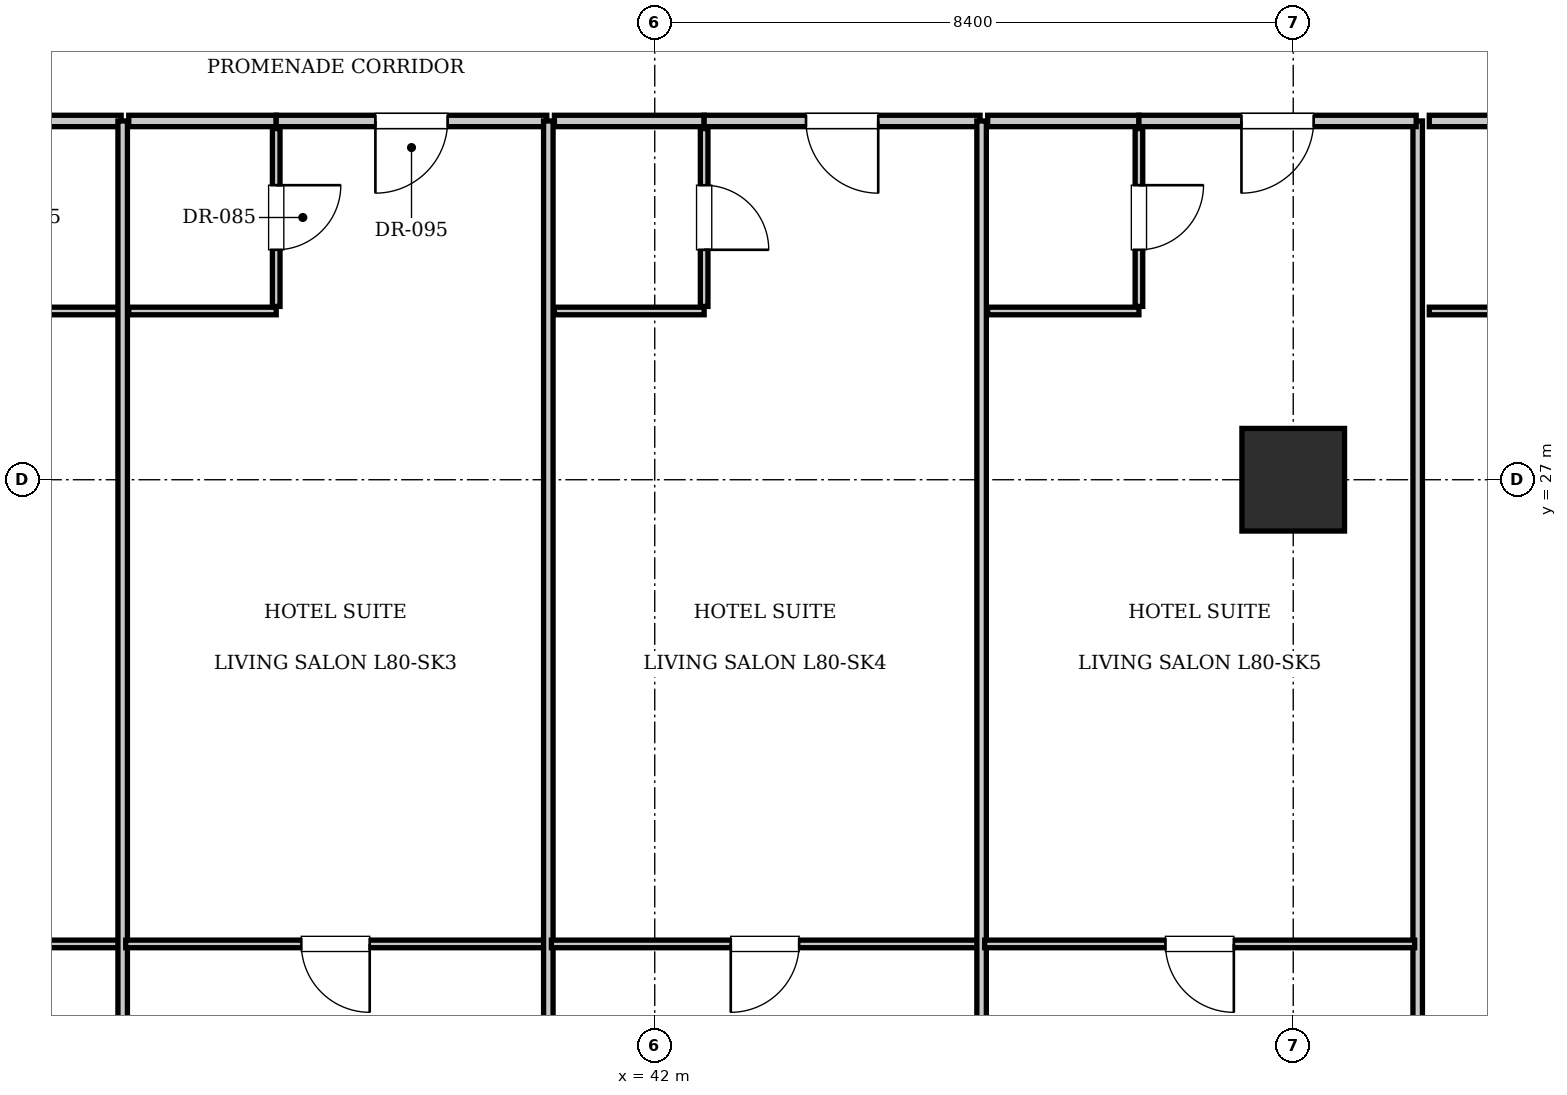
"""IFC4 building model, lengths in metres.
Left out: names, types, materials, properties, quantities, classifications, styles, units other than length and angle.
Written with IfcOpenShell. Run it as: python <this file> out.ifc"""

import sys

from ifc_helpers import new_model, si_unit, direction, frame, frame_2d, origin, origin_2d, place, context, subcontext, project, spatial, rectangle, extrude, element, fill, save


model = new_model("IFC4")
c1 = context("Model", 3, precision=1e-05, world=origin(), true_north=direction((0.0, 1.0)))
c2 = subcontext(c1, "Body", "Model", "MODEL_VIEW")
j1 = project(units=[si_unit("LENGTHUNIT", "METRE"), si_unit("PLANEANGLEUNIT", "RADIAN")], contexts=[c1])
p1 = place(None, origin())
s1 = spatial("IfcSite", under=j1, at=p1, CompositionType="ELEMENT")
p2 = place(p1, origin())
s2 = spatial("IfcBuilding", under=s1, at=p2, CompositionType="ELEMENT")
p3 = place(p2, frame((0.0, 0.0, 325.85)))
s3 = spatial("IfcBuildingStorey", under=s2, at=p3, CompositionType="ELEMENT", Elevation=325.85)
p4 = place(p3, frame((50.4, 27.0, 0.0), z_axis=(0.0, 0.0, 1.0), x_axis=(1.0, 0.0, 0.0)))
e1 = element("IfcColumn", 1, at=p4, inside=s3, PredefinedType="COLUMN", context=c2, shape_type="SweptSolid", body=[
    extrude(rectangle(XDim=1.35, YDim=1.35, at=origin_2d()), origin(), (0.0, 0.0, 1.0), 3.85),
])
p5 = place(p3, frame((52.038, 19.34, 0.0), z_axis=(0.0, 0.0, 1.0), x_axis=(0.0, 1.0, 0.0)))
e2 = element("IfcWall", 2, at=p5, inside=s3, PredefinedType="PARTITIONING", context=c2, shape_type="SweptSolid", body=[
    extrude(rectangle(XDim=12.38, YDim=0.125, at=frame_2d((6.19, 0.0))), origin(), (0.0, 0.0, 1.0), 3.61),
])
p6 = place(p3, frame((32.95, 31.72, 0.0), z_axis=(0.0, 0.0, 1.0), x_axis=(1.0, 0.0, 0.0)))
e3 = element("IfcWall", 3, at=p6, inside=s3, PredefinedType="PARTITIONING", context=c2, shape_type="SweptSolid", body=[
    extrude(rectangle(XDim=2.03, YDim=0.15, at=frame_2d((1.015, 0.0))), origin(), (0.0, 0.0, 1.0), 3.61),
])
p7 = place(p3, frame((32.95, 29.22, 0.0), z_axis=(0.0, 0.0, 1.0), x_axis=(1.0, 0.0, 0.0)))
e4 = element("IfcWall", 4, at=p7, inside=s3, PredefinedType="PARTITIONING", context=c2, shape_type="SweptSolid", body=[
    extrude(rectangle(XDim=2.01, YDim=0.1, at=frame_2d((1.005, 0.0))), origin(), (0.0, 0.0, 1.0), 3.61),
])
p8 = place(p3, frame((29.34, 20.893, 0.0), z_axis=(0.0, 0.0, 1.0), x_axis=(1.0, 0.0, 0.0)))
e5 = element("IfcWall", 5, at=p8, inside=s3, PredefinedType="PARTITIONING", context=c2, shape_type="SweptSolid", body=[
    extrude(rectangle(XDim=5.62, YDim=0.1, at=frame_2d((2.81, 0.0))), origin(), (0.0, 0.0, 1.0), 3.61),
])
p9 = place(p8, frame((2.36, 0.0, 0.0)))
e6 = element("IfcOpeningElement", 6, at=p9, cuts=e5, PredefinedType="OPENING", context=c2, shape_type="SweptSolid", body=[
    extrude(rectangle(XDim=0.9, YDim=2.1, at=frame_2d((0.45, 1.05))), frame((0.0, 0.06, 0.0), z_axis=(0.0, -1.0, 0.0), x_axis=(1.0, 0.0, 0.0)), (0.0, 0.0, 1.0), 0.12),
])
p10 = place(p3, frame((35.0, 13.9, 0.0), z_axis=(0.0, 0.0, 1.0), x_axis=(0.0, 1.0, 0.0)))
e7 = element("IfcWall", 7, at=p10, inside=s3, PredefinedType="PARTITIONING", context=c2, shape_type="SweptSolid", body=[
    extrude(rectangle(XDim=17.82, YDim=0.125, at=frame_2d((8.91, 0.0))), origin(), (0.0, 0.0, 1.0), 3.61),
])
p11 = place(p3, frame((35.08, 31.72, 0.0), z_axis=(0.0, 0.0, 1.0), x_axis=(1.0, 0.0, 0.0)))
e8 = element("IfcWall", 8, at=p11, inside=s3, PredefinedType="PARTITIONING", context=c2, shape_type="SweptSolid", body=[
    extrude(rectangle(XDim=1.94, YDim=0.15, at=frame_2d((0.97, 0.0))), origin(), (0.0, 0.0, 1.0), 3.61),
])
p12 = place(p3, frame((35.08, 29.22, 0.0), z_axis=(0.0, 0.0, 1.0), x_axis=(1.0, 0.0, 0.0)))
e9 = element("IfcWall", 9, at=p12, inside=s3, PredefinedType="PARTITIONING", context=c2, shape_type="SweptSolid", body=[
    extrude(rectangle(XDim=1.94, YDim=0.1, at=frame_2d((0.97, 0.0))), origin(), (0.0, 0.0, 1.0), 3.61),
])
p13 = place(p3, frame((37.02, 29.28, 0.0), z_axis=(0.0, 0.0, 1.0), x_axis=(0.0, 1.0, 0.0)))
e10 = element("IfcWall", 10, at=p13, inside=s3, PredefinedType="PARTITIONING", context=c2, shape_type="SweptSolid", body=[
    extrude(rectangle(XDim=2.34, YDim=0.1, at=frame_2d((1.17, 0.0))), origin(), (0.0, 0.0, 1.0), 3.61),
])
p14 = place(p13, frame((0.745, 0.0, 0.0)))
e11 = element("IfcOpeningElement", 11, at=p14, cuts=e10, PredefinedType="OPENING", context=c2, shape_type="SweptSolid", body=[
    extrude(rectangle(XDim=0.85, YDim=2.1, at=frame_2d((0.425, 1.05))), frame((0.0, 0.06, 0.0), z_axis=(0.0, -1.0, 0.0), x_axis=(1.0, 0.0, 0.0)), (0.0, 0.0, 1.0), 0.12),
])
p15 = place(p3, frame((37.02, 31.72, 0.0), z_axis=(0.0, 0.0, 1.0), x_axis=(1.0, 0.0, 0.0)))
e12 = element("IfcWall", 12, at=p15, inside=s3, PredefinedType="PARTITIONING", context=c2, shape_type="SweptSolid", body=[
    extrude(rectangle(XDim=3.56, YDim=0.15, at=frame_2d((1.78, 0.0))), origin(), (0.0, 0.0, 1.0), 3.61),
])
p16 = place(p15, frame((1.305, 0.0, 0.0)))
e13 = element("IfcOpeningElement", 13, at=p16, cuts=e12, PredefinedType="OPENING", context=c2, shape_type="SweptSolid", body=[
    extrude(rectangle(XDim=0.95, YDim=2.15, at=frame_2d((0.475, 1.075))), frame((0.0, 0.085, 0.0), z_axis=(0.0, -1.0, 0.0), x_axis=(1.0, 0.0, 0.0)), (0.0, 0.0, 1.0), 0.17),
])
p17 = place(p3, frame((35.04, 20.893, 0.0), z_axis=(0.0, 0.0, 1.0), x_axis=(1.0, 0.0, 0.0)))
e14 = element("IfcWall", 14, at=p17, inside=s3, PredefinedType="PARTITIONING", context=c2, shape_type="SweptSolid", body=[
    extrude(rectangle(XDim=5.52, YDim=0.1, at=frame_2d((2.76, 0.0))), origin(), (0.0, 0.0, 1.0), 3.61),
])
p18 = place(p17, frame((2.31, 0.0, 0.0)))
e15 = element("IfcOpeningElement", 15, at=p18, cuts=e14, PredefinedType="OPENING", context=c2, shape_type="SweptSolid", body=[
    extrude(rectangle(XDim=0.9, YDim=2.1, at=frame_2d((0.45, 1.05))), frame((0.0, 0.06, 0.0), z_axis=(0.0, -1.0, 0.0), x_axis=(1.0, 0.0, 0.0)), (0.0, 0.0, 1.0), 0.12),
])
p19 = place(p3, frame((40.6, 13.9, 0.0), z_axis=(0.0, 0.0, 1.0), x_axis=(0.0, 1.0, 0.0)))
e16 = element("IfcWall", 16, at=p19, inside=s3, PredefinedType="PARTITIONING", context=c2, shape_type="SweptSolid", body=[
    extrude(rectangle(XDim=17.82, YDim=0.125, at=frame_2d((8.91, 0.0))), origin(), (0.0, 0.0, 1.0), 3.61),
])
p20 = place(p3, frame((40.68, 31.72, 0.0), z_axis=(0.0, 0.0, 1.0), x_axis=(1.0, 0.0, 0.0)))
e17 = element("IfcWall", 17, at=p20, inside=s3, PredefinedType="PARTITIONING", context=c2, shape_type="SweptSolid", body=[
    extrude(rectangle(XDim=1.97, YDim=0.15, at=frame_2d((0.985, 0.0))), origin(), (0.0, 0.0, 1.0), 3.61),
])
p21 = place(p3, frame((40.68, 29.22, 0.0), z_axis=(0.0, 0.0, 1.0), x_axis=(1.0, 0.0, 0.0)))
e18 = element("IfcWall", 18, at=p21, inside=s3, PredefinedType="PARTITIONING", context=c2, shape_type="SweptSolid", body=[
    extrude(rectangle(XDim=1.97, YDim=0.1, at=frame_2d((0.985, 0.0))), origin(), (0.0, 0.0, 1.0), 3.61),
])
p22 = place(p3, frame((42.65, 29.28, 0.0), z_axis=(0.0, 0.0, 1.0), x_axis=(0.0, 1.0, 0.0)))
e19 = element("IfcWall", 19, at=p22, inside=s3, PredefinedType="PARTITIONING", context=c2, shape_type="SweptSolid", body=[
    extrude(rectangle(XDim=2.34, YDim=0.1, at=frame_2d((1.17, 0.0))), origin(), (0.0, 0.0, 1.0), 3.61),
])
p23 = place(p22, frame((0.745, 0.0, 0.0)))
e20 = element("IfcOpeningElement", 20, at=p23, cuts=e19, PredefinedType="OPENING", context=c2, shape_type="SweptSolid", body=[
    extrude(rectangle(XDim=0.85, YDim=2.1, at=frame_2d((0.425, 1.05))), frame((0.0, 0.06, 0.0), z_axis=(0.0, -1.0, 0.0), x_axis=(1.0, 0.0, 0.0)), (0.0, 0.0, 1.0), 0.12),
])
p24 = place(p3, frame((42.65, 31.72, 0.0), z_axis=(0.0, 0.0, 1.0), x_axis=(1.0, 0.0, 0.0)))
e21 = element("IfcWall", 21, at=p24, inside=s3, PredefinedType="PARTITIONING", context=c2, shape_type="SweptSolid", body=[
    extrude(rectangle(XDim=3.63, YDim=0.15, at=frame_2d((1.815, 0.0))), origin(), (0.0, 0.0, 1.0), 3.61),
])
p25 = place(p24, frame((1.34, 0.0, 0.0)))
e22 = element("IfcOpeningElement", 22, at=p25, cuts=e21, PredefinedType="OPENING", context=c2, shape_type="SweptSolid", body=[
    extrude(rectangle(XDim=0.95, YDim=2.15, at=frame_2d((0.475, 1.075))), frame((0.0, 0.085, 0.0), z_axis=(0.0, -1.0, 0.0), x_axis=(1.0, 0.0, 0.0)), (0.0, 0.0, 1.0), 0.17),
])
p26 = place(p3, frame((40.64, 20.893, 0.0), z_axis=(0.0, 0.0, 1.0), x_axis=(1.0, 0.0, 0.0)))
e23 = element("IfcWall", 23, at=p26, inside=s3, PredefinedType="PARTITIONING", context=c2, shape_type="SweptSolid", body=[
    extrude(rectangle(XDim=5.62, YDim=0.1, at=frame_2d((2.81, 0.0))), origin(), (0.0, 0.0, 1.0), 3.61),
])
p27 = place(p26, frame((2.36, 0.0, 0.0)))
e24 = element("IfcOpeningElement", 24, at=p27, cuts=e23, PredefinedType="OPENING", context=c2, shape_type="SweptSolid", body=[
    extrude(rectangle(XDim=0.9, YDim=2.1, at=frame_2d((0.45, 1.05))), frame((0.0, 0.06, 0.0), z_axis=(0.0, -1.0, 0.0), x_axis=(1.0, 0.0, 0.0)), (0.0, 0.0, 1.0), 0.12),
])
p28 = place(p3, frame((46.3, 13.9, 0.0), z_axis=(0.0, 0.0, 1.0), x_axis=(0.0, 1.0, 0.0)))
e25 = element("IfcWall", 25, at=p28, inside=s3, PredefinedType="PARTITIONING", context=c2, shape_type="SweptSolid", body=[
    extrude(rectangle(XDim=17.82, YDim=0.125, at=frame_2d((8.91, 0.0))), origin(), (0.0, 0.0, 1.0), 3.344),
])
p29 = place(p3, frame((46.38, 31.72, 0.0), z_axis=(0.0, 0.0, 1.0), x_axis=(1.0, 0.0, 0.0)))
e26 = element("IfcWall", 26, at=p29, inside=s3, PredefinedType="PARTITIONING", context=c2, shape_type="SweptSolid", body=[
    extrude(rectangle(XDim=1.99, YDim=0.15, at=frame_2d((0.995, 0.0))), origin(), (0.0, 0.0, 1.0), 3.61),
])
p30 = place(p3, frame((46.38, 29.22, 0.0), z_axis=(0.0, 0.0, 1.0), x_axis=(1.0, 0.0, 0.0)))
e27 = element("IfcWall", 27, at=p30, inside=s3, PredefinedType="PARTITIONING", context=c2, shape_type="SweptSolid", body=[
    extrude(rectangle(XDim=1.99, YDim=0.1, at=frame_2d((0.995, 0.0))), origin(), (0.0, 0.0, 1.0), 3.61),
])
p31 = place(p3, frame((48.37, 29.28, 0.0), z_axis=(0.0, 0.0, 1.0), x_axis=(0.0, 1.0, 0.0)))
e28 = element("IfcWall", 28, at=p31, inside=s3, PredefinedType="PARTITIONING", context=c2, shape_type="SweptSolid", body=[
    extrude(rectangle(XDim=2.34, YDim=0.1, at=frame_2d((1.17, 0.0))), origin(), (0.0, 0.0, 1.0), 3.61),
])
p32 = place(p31, frame((0.745, 0.0, 0.0)))
e29 = element("IfcOpeningElement", 29, at=p32, cuts=e28, PredefinedType="OPENING", context=c2, shape_type="SweptSolid", body=[
    extrude(rectangle(XDim=0.85, YDim=2.1, at=frame_2d((0.425, 1.05))), frame((0.0, 0.06, 0.0), z_axis=(0.0, -1.0, 0.0), x_axis=(1.0, 0.0, 0.0)), (0.0, 0.0, 1.0), 0.12),
])
p33 = place(p3, frame((48.37, 31.72, 0.0), z_axis=(0.0, 0.0, 1.0), x_axis=(1.0, 0.0, 0.0)))
e30 = element("IfcWall", 30, at=p33, inside=s3, PredefinedType="PARTITIONING", context=c2, shape_type="SweptSolid", body=[
    extrude(rectangle(XDim=3.647, YDim=0.15, at=frame_2d((1.824, 0.0))), origin(), (0.0, 0.0, 1.0), 3.61),
])
p34 = place(p33, frame((1.349, 0.0, 0.0)))
e31 = element("IfcOpeningElement", 31, at=p34, cuts=e30, PredefinedType="OPENING", context=c2, shape_type="SweptSolid", body=[
    extrude(rectangle(XDim=0.95, YDim=2.15, at=frame_2d((0.475, 1.075))), frame((0.0, 0.085, 0.0), z_axis=(0.0, -1.0, 0.0), x_axis=(1.0, 0.0, 0.0)), (0.0, 0.0, 1.0), 0.17),
])
p35 = place(p3, frame((46.34, 20.893, 0.0), z_axis=(0.0, 0.0, 1.0), x_axis=(1.0, 0.0, 0.0)))
e32 = element("IfcWall", 32, at=p35, inside=s3, PredefinedType="PARTITIONING", context=c2, shape_type="SweptSolid", body=[
    extrude(rectangle(XDim=5.657, YDim=0.1, at=frame_2d((2.829, 0.0))), origin(), (0.0, 0.0, 1.0), 3.61),
])
p36 = place(p35, frame((2.379, 0.0, 0.0)))
e33 = element("IfcOpeningElement", 33, at=p36, cuts=e32, PredefinedType="OPENING", context=c2, shape_type="SweptSolid", body=[
    extrude(rectangle(XDim=0.9, YDim=2.1, at=frame_2d((0.45, 1.05))), frame((0.0, 0.06, 0.0), z_axis=(0.0, -1.0, 0.0), x_axis=(1.0, 0.0, 0.0)), (0.0, 0.0, 1.0), 0.12),
])
p37 = place(p3, frame((52.19, 31.72, 0.0), z_axis=(0.0, 0.0, 1.0), x_axis=(1.0, 0.0, 0.0)))
e34 = element("IfcWall", 34, at=p37, inside=s3, PredefinedType="PARTITIONING", context=c2, shape_type="SweptSolid", body=[
    extrude(rectangle(XDim=2.0, YDim=0.15, at=frame_2d((1.0, 0.0))), origin(), (0.0, 0.0, 1.0), 3.61),
])
p38 = place(p3, frame((52.19, 29.22, 0.0), z_axis=(0.0, 0.0, 1.0), x_axis=(1.0, 0.0, 0.0)))
e35 = element("IfcWall", 35, at=p38, inside=s3, PredefinedType="PARTITIONING", context=c2, shape_type="SweptSolid", body=[
    extrude(rectangle(XDim=2.0, YDim=0.1, at=frame_2d((1.0, 0.0))), origin(), (0.0, 0.0, 1.0), 3.61),
])
p39 = place(p14, frame((0.85, 0.0, 0.0), z_axis=(0.0, 0.0, 1.0), x_axis=(-1.0, 0.0, 0.0)))
e36 = element("IfcDoor", 36, at=p39, inside=s3, OperationType="SINGLE_SWING_LEFT", PredefinedType="DOOR", context=c2, shape_type="SweptSolid", body=[
    extrude(rectangle(XDim=0.85, YDim=2.1, at=frame_2d((0.425, 1.05))), frame((0.0, 0.025, 0.0), z_axis=(0.0, -1.0, 0.0), x_axis=(1.0, 0.0, 0.0)), (0.0, 0.0, 1.0), 0.05),
])
fill(e11, e36)
p40 = place(p16, frame((0.95, 0.0, 0.0), z_axis=(0.0, 0.0, 1.0), x_axis=(-1.0, 0.0, 0.0)))
e37 = element("IfcDoor", 37, at=p40, inside=s3, OperationType="SINGLE_SWING_RIGHT", PredefinedType="DOOR", context=c2, shape_type="SweptSolid", body=[
    extrude(rectangle(XDim=0.95, YDim=2.15, at=frame_2d((0.475, 1.075))), frame((0.0, 0.025, 0.0), z_axis=(0.0, -1.0, 0.0), x_axis=(1.0, 0.0, 0.0)), (0.0, 0.0, 1.0), 0.05),
])
fill(e13, e37)
p41 = place(p18, frame((0.9, 0.0, 0.0), z_axis=(0.0, 0.0, 1.0), x_axis=(-1.0, 0.0, 0.0)))
e38 = element("IfcDoor", 38, at=p41, inside=s3, OperationType="SINGLE_SWING_LEFT", PredefinedType="DOOR", context=c2, shape_type="SweptSolid", body=[
    extrude(rectangle(XDim=0.9, YDim=2.1, at=frame_2d((0.45, 1.05))), frame((0.0, 0.025, 0.0), z_axis=(0.0, -1.0, 0.0), x_axis=(1.0, 0.0, 0.0)), (0.0, 0.0, 1.0), 0.05),
])
fill(e15, e38)
p42 = place(p23, frame((0.85, 0.0, 0.0), z_axis=(0.0, 0.0, 1.0), x_axis=(-1.0, 0.0, 0.0)))
e39 = element("IfcDoor", 39, at=p42, inside=s3, OperationType="SINGLE_SWING_RIGHT", PredefinedType="DOOR", context=c2, shape_type="SweptSolid", body=[
    extrude(rectangle(XDim=0.85, YDim=2.1, at=frame_2d((0.425, 1.05))), frame((0.0, 0.025, 0.0), z_axis=(0.0, -1.0, 0.0), x_axis=(1.0, 0.0, 0.0)), (0.0, 0.0, 1.0), 0.05),
])
fill(e20, e39)
p43 = place(p25, frame((0.95, 0.0, 0.0), z_axis=(0.0, 0.0, 1.0), x_axis=(-1.0, 0.0, 0.0)))
e40 = element("IfcDoor", 40, at=p43, inside=s3, OperationType="SINGLE_SWING_LEFT", PredefinedType="DOOR", context=c2, shape_type="SweptSolid", body=[
    extrude(rectangle(XDim=0.95, YDim=2.15, at=frame_2d((0.475, 1.075))), frame((0.0, 0.025, 0.0), z_axis=(0.0, -1.0, 0.0), x_axis=(1.0, 0.0, 0.0)), (0.0, 0.0, 1.0), 0.05),
])
fill(e22, e40)
p44 = place(p27, frame((0.9, 0.0, 0.0), z_axis=(0.0, 0.0, 1.0), x_axis=(-1.0, 0.0, 0.0)))
e41 = element("IfcDoor", 41, at=p44, inside=s3, OperationType="SINGLE_SWING_RIGHT", PredefinedType="DOOR", context=c2, shape_type="SweptSolid", body=[
    extrude(rectangle(XDim=0.9, YDim=2.1, at=frame_2d((0.45, 1.05))), frame((0.0, 0.025, 0.0), z_axis=(0.0, -1.0, 0.0), x_axis=(1.0, 0.0, 0.0)), (0.0, 0.0, 1.0), 0.05),
])
fill(e24, e41)
p45 = place(p32, frame((0.85, 0.0, 0.0), z_axis=(0.0, 0.0, 1.0), x_axis=(-1.0, 0.0, 0.0)))
e42 = element("IfcDoor", 42, at=p45, inside=s3, OperationType="SINGLE_SWING_LEFT", PredefinedType="DOOR", context=c2, shape_type="SweptSolid", body=[
    extrude(rectangle(XDim=0.85, YDim=2.1, at=frame_2d((0.425, 1.05))), frame((0.0, 0.025, 0.0), z_axis=(0.0, -1.0, 0.0), x_axis=(1.0, 0.0, 0.0)), (0.0, 0.0, 1.0), 0.05),
])
fill(e29, e42)
p46 = place(p34, frame((0.95, 0.0, 0.0), z_axis=(0.0, 0.0, 1.0), x_axis=(-1.0, 0.0, 0.0)))
e43 = element("IfcDoor", 43, at=p46, inside=s3, OperationType="SINGLE_SWING_RIGHT", PredefinedType="DOOR", context=c2, shape_type="SweptSolid", body=[
    extrude(rectangle(XDim=0.95, YDim=2.15, at=frame_2d((0.475, 1.075))), frame((0.0, 0.025, 0.0), z_axis=(0.0, -1.0, 0.0), x_axis=(1.0, 0.0, 0.0)), (0.0, 0.0, 1.0), 0.05),
])
fill(e31, e43)
p47 = place(p36, frame((0.9, 0.0, 0.0), z_axis=(0.0, 0.0, 1.0), x_axis=(-1.0, 0.0, 0.0)))
e44 = element("IfcDoor", 44, at=p47, inside=s3, OperationType="SINGLE_SWING_LEFT", PredefinedType="DOOR", context=c2, shape_type="SweptSolid", body=[
    extrude(rectangle(XDim=0.9, YDim=2.1, at=frame_2d((0.45, 1.05))), frame((0.0, 0.025, 0.0), z_axis=(0.0, -1.0, 0.0), x_axis=(1.0, 0.0, 0.0)), (0.0, 0.0, 1.0), 0.05),
])
fill(e33, e44)
save(model, sys.argv[1])
